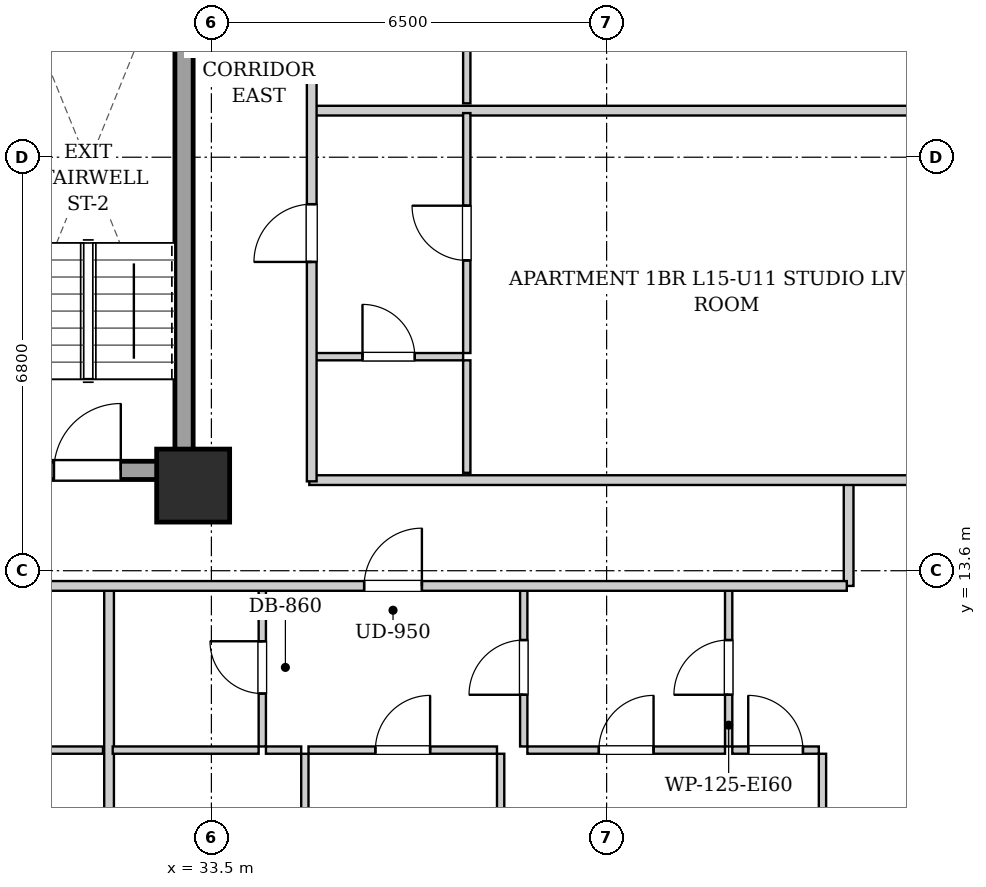
"""IFC4 building model, lengths in metres.
Left out: names, types, materials, properties, quantities, classifications, styles, units other than length and angle.
Written with IfcOpenShell. Run it as: python <this file> out.ifc"""

import sys

from ifc_helpers import new_model, si_unit, direction, frame, frame_2d, origin, origin_2d, place, context, subcontext, project, spatial, rectangle, extrude, element, fill, save


model = new_model("IFC4")
c1 = context("Model", 3, precision=1e-05, world=origin(), true_north=direction((0.0, 1.0)))
c2 = subcontext(c1, "Body", "Model", "MODEL_VIEW")
j1 = project(units=[si_unit("LENGTHUNIT", "METRE"), si_unit("PLANEANGLEUNIT", "RADIAN")], contexts=[c1])
p1 = place(None, origin())
s1 = spatial("IfcSite", under=j1, at=p1, CompositionType="ELEMENT")
p2 = place(p1, origin())
s2 = spatial("IfcBuilding", under=s1, at=p2, CompositionType="ELEMENT")
p3 = place(p2, frame((0.0, 0.0, 57.8)))
s3 = spatial("IfcBuildingStorey", under=s2, at=p3, CompositionType="ELEMENT", Elevation=57.8)
p4 = place(p3, frame((33.2, 15.0, 0.0), z_axis=(0.0, 0.0, 1.0), x_axis=(1.0, 0.0, 0.0)))
e1 = element("IfcColumn", 1, at=p4, inside=s3, PredefinedType="COLUMN", context=c2, shape_type="SweptSolid", body=[
    extrude(rectangle(XDim=1.2, YDim=1.2, at=origin_2d()), origin(), (0.0, 0.0, 1.0), 3.2),
])
p5 = place(p3, frame((33.05, 15.1, 0.0), z_axis=(0.0, 0.0, 1.0), x_axis=(0.0, 1.0, 0.0)))
e2 = element("IfcWall", 2, at=p5, inside=s3, PredefinedType="SHEAR", context=c2, shape_type="SweptSolid", body=[
    extrude(rectangle(XDim=9.0, YDim=0.3, at=frame_2d((4.5, 0.0))), origin(), (0.0, 0.0, 1.0), 2.94),
])
p6 = place(p3, frame((30.05, 15.25, 0.0), z_axis=(0.0, 0.0, 1.0), x_axis=(1.0, 0.0, 0.0)))
e3 = element("IfcWall", 3, at=p6, inside=s3, PredefinedType="SHEAR", context=c2, shape_type="SweptSolid", body=[
    extrude(rectangle(XDim=2.85, YDim=0.3, at=frame_2d((1.425, 0.0))), origin(), (0.0, 0.0, 1.0), 2.94),
])
p7 = place(p6, frame((0.86, 0.0, 0.0)))
e4 = element("IfcOpeningElement", 4, at=p7, cuts=e3, PredefinedType="OPENING", context=c2, shape_type="SweptSolid", body=[
    extrude(rectangle(XDim=1.1, YDim=2.05, at=frame_2d((0.55, 1.025))), frame((0.0, 0.16, 0.0), z_axis=(0.0, -1.0, 0.0), x_axis=(1.0, 0.0, 0.0)), (0.0, 0.0, 1.0), 0.32),
])
p8 = place(p3, frame((43.98, 13.35, 0.0), z_axis=(0.0, 0.0, 1.0), x_axis=(0.0, 1.0, 0.0)))
e5 = element("IfcWall", 5, at=p8, inside=s3, PredefinedType="PARTITIONING", context=c2, shape_type="SweptSolid", body=[
    extrude(rectangle(XDim=1.74, YDim=0.16, at=frame_2d((0.87, 0.0))), origin(), (0.0, 0.0, 1.0), 2.94),
])
p9 = place(p3, frame((35.11, 15.09, 0.0), z_axis=(0.0, 0.0, 1.0), x_axis=(1.0, 0.0, 0.0)))
e6 = element("IfcWall", 6, at=p9, inside=s3, PredefinedType="PARTITIONING", context=c2, shape_type="SweptSolid", body=[
    extrude(rectangle(XDim=11.11, YDim=0.16, at=frame_2d((5.555, 0.0))), origin(), (0.0, 0.0, 1.0), 2.232),
])
p10 = place(p3, frame((28.799, 10.65, 0.0), z_axis=(0.0, 0.0, 1.0), x_axis=(1.0, 0.0, 0.0)))
e7 = element("IfcWall", 7, at=p10, inside=s3, PredefinedType="PARTITIONING", context=c2, shape_type="SweptSolid", body=[
    extrude(rectangle(XDim=2.918, YDim=0.12, at=frame_2d((1.459, 0.0))), origin(), (0.0, 0.0, 1.0), 2.94),
])
p11 = place(p10, frame((1.009, 0.0, 0.0)))
e8 = element("IfcOpeningElement", 8, at=p11, cuts=e7, PredefinedType="OPENING", context=c2, shape_type="SweptSolid", body=[
    extrude(rectangle(XDim=0.9, YDim=2.05, at=frame_2d((0.45, 1.025))), frame((0.0, 0.07, 0.0), z_axis=(0.0, -1.0, 0.0), x_axis=(1.0, 0.0, 0.0)), (0.0, 0.0, 1.0), 0.14),
])
p12 = place(p3, frame((31.817, 0.28, 0.0), z_axis=(0.0, 0.0, 1.0), x_axis=(0.0, 1.0, 0.0)))
e9 = element("IfcWall", 9, at=p12, inside=s3, PredefinedType="PARTITIONING", context=c2, shape_type="SweptSolid", body=[
    extrude(rectangle(XDim=13.03, YDim=0.16, at=frame_2d((6.515, 0.0))), origin(), (0.0, 0.0, 1.0), 2.94),
])
p13 = place(p3, frame((34.337, 10.71, 0.0), z_axis=(0.0, 0.0, 1.0), x_axis=(0.0, 1.0, 0.0)))
e10 = element("IfcWall", 10, at=p13, inside=s3, PredefinedType="PARTITIONING", context=c2, shape_type="SweptSolid", body=[
    extrude(rectangle(XDim=2.6, YDim=0.12, at=frame_2d((1.3, 0.0))), origin(), (0.0, 0.0, 1.0), 2.94),
])
p14 = place(p13, frame((0.87, 0.0, 0.0)))
e11 = element("IfcOpeningElement", 11, at=p14, cuts=e10, PredefinedType="OPENING", context=c2, shape_type="SweptSolid", body=[
    extrude(rectangle(XDim=0.86, YDim=2.05, at=frame_2d((0.43, 1.025))), frame((0.0, 0.07, 0.0), z_axis=(0.0, -1.0, 0.0), x_axis=(1.0, 0.0, 0.0)), (0.0, 0.0, 1.0), 0.14),
])
p15 = place(p3, frame((31.877, 10.65, 0.0), z_axis=(0.0, 0.0, 1.0), x_axis=(1.0, 0.0, 0.0)))
e12 = element("IfcWall", 12, at=p15, inside=s3, PredefinedType="PARTITIONING", context=c2, shape_type="SweptSolid", body=[
    extrude(rectangle(XDim=2.4, YDim=0.12, at=frame_2d((1.2, 0.0))), origin(), (0.0, 0.0, 1.0), 2.94),
])
p16 = place(p3, frame((38.637, 10.71, 0.0), z_axis=(0.0, 0.0, 1.0), x_axis=(0.0, 1.0, 0.0)))
e13 = element("IfcWall", 13, at=p16, inside=s3, PredefinedType="PARTITIONING", context=c2, shape_type="SweptSolid", body=[
    extrude(rectangle(XDim=2.6, YDim=0.12, at=frame_2d((1.3, 0.0))), origin(), (0.0, 0.0, 1.0), 2.94),
])
p17 = place(p16, frame((0.85, 0.0, 0.0)))
e14 = element("IfcOpeningElement", 14, at=p17, cuts=e13, PredefinedType="OPENING", context=c2, shape_type="SweptSolid", body=[
    extrude(rectangle(XDim=0.9, YDim=2.05, at=frame_2d((0.45, 1.025))), frame((0.0, 0.07, 0.0), z_axis=(0.0, -1.0, 0.0), x_axis=(1.0, 0.0, 0.0)), (0.0, 0.0, 1.0), 0.14),
])
p18 = place(p3, frame((34.397, 10.65, 0.0), z_axis=(0.0, 0.0, 1.0), x_axis=(1.0, 0.0, 0.0)))
e15 = element("IfcWall", 15, at=p18, inside=s3, PredefinedType="PARTITIONING", context=c2, shape_type="SweptSolid", body=[
    extrude(rectangle(XDim=0.58, YDim=0.12, at=frame_2d((0.29, 0.0))), origin(), (0.0, 0.0, 1.0), 2.94),
])
p19 = place(p3, frame((35.097, 10.65, 0.0), z_axis=(0.0, 0.0, 1.0), x_axis=(1.0, 0.0, 0.0)))
e16 = element("IfcWall", 16, at=p19, inside=s3, PredefinedType="PARTITIONING", context=c2, shape_type="SweptSolid", body=[
    extrude(rectangle(XDim=3.1, YDim=0.12, at=frame_2d((1.55, 0.0))), origin(), (0.0, 0.0, 1.0), 2.94),
])
p20 = place(p19, frame((1.1, 0.0, 0.0)))
e17 = element("IfcOpeningElement", 17, at=p20, cuts=e16, PredefinedType="OPENING", context=c2, shape_type="SweptSolid", body=[
    extrude(rectangle(XDim=0.9, YDim=2.05, at=frame_2d((0.45, 1.025))), frame((0.0, 0.07, 0.0), z_axis=(0.0, -1.0, 0.0), x_axis=(1.0, 0.0, 0.0)), (0.0, 0.0, 1.0), 0.14),
])
p21 = place(p3, frame((42.007, 10.71, 0.0), z_axis=(0.0, 0.0, 1.0), x_axis=(0.0, 1.0, 0.0)))
e18 = element("IfcWall", 18, at=p21, inside=s3, PredefinedType="PARTITIONING", context=c2, shape_type="SweptSolid", body=[
    extrude(rectangle(XDim=2.6, YDim=0.12, at=frame_2d((1.3, 0.0))), origin(), (0.0, 0.0, 1.0), 2.94),
])
p22 = place(p21, frame((0.85, 0.0, 0.0)))
e19 = element("IfcOpeningElement", 19, at=p22, cuts=e18, PredefinedType="OPENING", context=c2, shape_type="SweptSolid", body=[
    extrude(rectangle(XDim=0.9, YDim=2.05, at=frame_2d((0.45, 1.025))), frame((0.0, 0.07, 0.0), z_axis=(0.0, -1.0, 0.0), x_axis=(1.0, 0.0, 0.0)), (0.0, 0.0, 1.0), 0.14),
])
p23 = place(p3, frame((38.697, 10.65, 0.0), z_axis=(0.0, 0.0, 1.0), x_axis=(1.0, 0.0, 0.0)))
e20 = element("IfcWall", 20, at=p23, inside=s3, PredefinedType="PARTITIONING", context=c2, shape_type="SweptSolid", body=[
    extrude(rectangle(XDim=3.25, YDim=0.12, at=frame_2d((1.625, 0.0))), origin(), (0.0, 0.0, 1.0), 2.94),
])
p24 = place(p23, frame((1.175, 0.0, 0.0)))
e21 = element("IfcOpeningElement", 21, at=p24, cuts=e20, PredefinedType="OPENING", context=c2, shape_type="SweptSolid", body=[
    extrude(rectangle(XDim=0.9, YDim=2.05, at=frame_2d((0.45, 1.025))), frame((0.0, 0.07, 0.0), z_axis=(0.0, -1.0, 0.0), x_axis=(1.0, 0.0, 0.0)), (0.0, 0.0, 1.0), 0.14),
])
p25 = place(p3, frame((42.067, 10.65, 0.0), z_axis=(0.0, 0.0, 1.0), x_axis=(1.0, 0.0, 0.0)))
e22 = element("IfcWall", 22, at=p25, inside=s3, PredefinedType="PARTITIONING", context=c2, shape_type="SweptSolid", body=[
    extrude(rectangle(XDim=1.423, YDim=0.12, at=frame_2d((0.711, 0.0))), origin(), (0.0, 0.0, 1.0), 2.94),
])
p26 = place(p25, frame((0.262, 0.0, 0.0)))
e23 = element("IfcOpeningElement", 23, at=p26, cuts=e22, PredefinedType="OPENING", context=c2, shape_type="SweptSolid", body=[
    extrude(rectangle(XDim=0.9, YDim=2.05, at=frame_2d((0.45, 1.025))), frame((0.0, 0.07, 0.0), z_axis=(0.0, -1.0, 0.0), x_axis=(1.0, 0.0, 0.0)), (0.0, 0.0, 1.0), 0.14),
])
p27 = place(p3, frame((35.037, 0.28, 0.0), z_axis=(0.0, 0.0, 1.0), x_axis=(0.0, 1.0, 0.0)))
e24 = element("IfcWall", 24, at=p27, inside=s3, PredefinedType="PARTITIONING", context=c2, shape_type="SweptSolid", body=[
    extrude(rectangle(XDim=10.31, YDim=0.12, at=frame_2d((5.155, 0.0))), origin(), (0.0, 0.0, 1.0), 2.94),
])
p28 = place(p27, frame((4.69, 0.0, 0.0)))
e25 = element("IfcOpeningElement", 25, at=p28, cuts=e24, PredefinedType="OPENING", context=c2, shape_type="SweptSolid", body=[
    extrude(rectangle(XDim=0.9, YDim=2.05, at=frame_2d((0.45, 1.025))), frame((0.0, 0.07, 0.0), z_axis=(0.0, -1.0, 0.0), x_axis=(1.0, 0.0, 0.0)), (0.0, 0.0, 1.0), 0.14),
])
p29 = place(p3, frame((38.257, 0.28, 0.0), z_axis=(0.0, 0.0, 1.0), x_axis=(0.0, 1.0, 0.0)))
e26 = element("IfcWall", 26, at=p29, inside=s3, PredefinedType="PARTITIONING", context=c2, shape_type="SweptSolid", body=[
    extrude(rectangle(XDim=10.31, YDim=0.12, at=frame_2d((5.155, 0.0))), origin(), (0.0, 0.0, 1.0), 2.94),
])
p30 = place(p29, frame((4.69, 0.0, 0.0)))
e27 = element("IfcOpeningElement", 27, at=p30, cuts=e26, PredefinedType="OPENING", context=c2, shape_type="SweptSolid", body=[
    extrude(rectangle(XDim=0.9, YDim=2.05, at=frame_2d((0.45, 1.025))), frame((0.0, 0.07, 0.0), z_axis=(0.0, -1.0, 0.0), x_axis=(1.0, 0.0, 0.0)), (0.0, 0.0, 1.0), 0.14),
])
p31 = place(p3, frame((43.55, 0.28, 0.0), z_axis=(0.0, 0.0, 1.0), x_axis=(0.0, 1.0, 0.0)))
e28 = element("IfcWall", 28, at=p31, inside=s3, PredefinedType="PARTITIONING", context=c2, shape_type="SweptSolid", body=[
    extrude(rectangle(XDim=10.31, YDim=0.12, at=frame_2d((5.155, 0.0))), origin(), (0.0, 0.0, 1.0), 2.94),
])
p32 = place(p31, frame((4.69, 0.0, 0.0)))
e29 = element("IfcOpeningElement", 29, at=p32, cuts=e28, PredefinedType="OPENING", context=c2, shape_type="SweptSolid", body=[
    extrude(rectangle(XDim=0.9, YDim=2.05, at=frame_2d((0.45, 1.025))), frame((0.0, 0.07, 0.0), z_axis=(0.0, -1.0, 0.0), x_axis=(1.0, 0.0, 0.0)), (0.0, 0.0, 1.0), 0.14),
])
p33 = place(p3, frame((35.19, 21.166, 0.0), z_axis=(0.0, 0.0, 1.0), x_axis=(1.0, 0.0, 0.0)))
e30 = element("IfcWall", 30, at=p33, inside=s3, PredefinedType="PARTITIONING", context=c2, shape_type="SweptSolid", body=[
    extrude(rectangle(XDim=11.03, YDim=0.16, at=frame_2d((5.515, 0.0))), origin(), (0.0, 0.0, 1.0), 2.94),
])
p34 = place(p3, frame((35.19, 17.12, 0.0), z_axis=(0.0, 0.0, 1.0), x_axis=(1.0, 0.0, 0.0)))
e31 = element("IfcWall", 31, at=p34, inside=s3, PredefinedType="PARTITIONING", context=c2, shape_type="SweptSolid", body=[
    extrude(rectangle(XDim=2.45, YDim=0.12, at=frame_2d((1.225, 0.0))), origin(), (0.0, 0.0, 1.0), 2.94),
])
p35 = place(p34, frame((0.795, 0.0, 0.0)))
e32 = element("IfcOpeningElement", 32, at=p35, cuts=e31, PredefinedType="OPENING", context=c2, shape_type="SweptSolid", body=[
    extrude(rectangle(XDim=0.86, YDim=2.05, at=frame_2d((0.43, 1.025))), frame((0.0, 0.07, 0.0), z_axis=(0.0, -1.0, 0.0), x_axis=(1.0, 0.0, 0.0)), (0.0, 0.0, 1.0), 0.14),
])
p36 = place(p3, frame((37.7, 15.21, 0.0), z_axis=(0.0, 0.0, 1.0), x_axis=(0.0, 1.0, 0.0)))
e33 = element("IfcWall", 33, at=p36, inside=s3, PredefinedType="PARTITIONING", context=c2, shape_type="SweptSolid", body=[
    extrude(rectangle(XDim=1.85, YDim=0.12, at=frame_2d((0.925, 0.0))), origin(), (0.0, 0.0, 1.0), 2.94),
])
p37 = place(p3, frame((37.7, 17.18, 0.0), z_axis=(0.0, 0.0, 1.0), x_axis=(0.0, 1.0, 0.0)))
e34 = element("IfcWall", 34, at=p37, inside=s3, PredefinedType="PARTITIONING", context=c2, shape_type="SweptSolid", body=[
    extrude(rectangle(XDim=3.946, YDim=0.12, at=frame_2d((1.973, 0.0))), origin(), (0.0, 0.0, 1.0), 2.94),
])
p38 = place(p37, frame((1.523, 0.0, 0.0)))
e35 = element("IfcOpeningElement", 35, at=p38, cuts=e34, PredefinedType="OPENING", context=c2, shape_type="SweptSolid", body=[
    extrude(rectangle(XDim=0.9, YDim=2.05, at=frame_2d((0.45, 1.025))), frame((0.0, 0.07, 0.0), z_axis=(0.0, -1.0, 0.0), x_axis=(1.0, 0.0, 0.0)), (0.0, 0.0, 1.0), 0.14),
])
p39 = place(p3, frame((37.7, 21.286, 0.0), z_axis=(0.0, 0.0, 1.0), x_axis=(0.0, 1.0, 0.0)))
e36 = element("IfcWall", 36, at=p39, inside=s3, PredefinedType="PARTITIONING", context=c2, shape_type="SweptSolid", body=[
    extrude(rectangle(XDim=2.121, YDim=0.12, at=frame_2d((1.061, 0.0))), origin(), (0.0, 0.0, 1.0), 2.94),
])
p40 = place(p3, frame((10.05, 13.35, 0.0), z_axis=(0.0, 0.0, 1.0), x_axis=(1.0, 0.0, 0.0)))
e37 = element("IfcWall", 37, at=p40, inside=s3, PredefinedType="PARTITIONING", context=c2, shape_type="SweptSolid", body=[
    extrude(rectangle(XDim=33.9, YDim=0.16, at=frame_2d((16.95, 0.0))), origin(), (0.0, 0.0, 1.0), 2.94),
])
p41 = place(p40, frame((0.813, 0.0, 0.0)))
e38 = element("IfcOpeningElement", 38, at=p41, cuts=e37, PredefinedType="OPENING", context=c2, shape_type="SweptSolid", body=[
    extrude(rectangle(XDim=0.95, YDim=2.1, at=frame_2d((0.475, 1.05))), frame((0.0, 0.09, 0.0), z_axis=(0.0, -1.0, 0.0), x_axis=(1.0, 0.0, 0.0)), (0.0, 0.0, 1.0), 0.18),
])
p42 = place(p40, frame((6.04, 0.0, 0.0)))
e39 = element("IfcOpeningElement", 39, at=p42, cuts=e37, PredefinedType="OPENING", context=c2, shape_type="SweptSolid", body=[
    extrude(rectangle(XDim=0.95, YDim=2.1, at=frame_2d((0.475, 1.05))), frame((0.0, 0.09, 0.0), z_axis=(0.0, -1.0, 0.0), x_axis=(1.0, 0.0, 0.0)), (0.0, 0.0, 1.0), 0.18),
])
p43 = place(p40, frame((18.09, 0.0, 0.0)))
e40 = element("IfcOpeningElement", 40, at=p43, cuts=e37, PredefinedType="OPENING", context=c2, shape_type="SweptSolid", body=[
    extrude(rectangle(XDim=0.95, YDim=2.1, at=frame_2d((0.475, 1.05))), frame((0.0, 0.09, 0.0), z_axis=(0.0, -1.0, 0.0), x_axis=(1.0, 0.0, 0.0)), (0.0, 0.0, 1.0), 0.18),
])
p44 = place(p40, frame((25.962, 0.0, 0.0)))
e41 = element("IfcOpeningElement", 41, at=p44, cuts=e37, PredefinedType="OPENING", context=c2, shape_type="SweptSolid", body=[
    extrude(rectangle(XDim=0.95, YDim=2.1, at=frame_2d((0.475, 1.05))), frame((0.0, 0.09, 0.0), z_axis=(0.0, -1.0, 0.0), x_axis=(1.0, 0.0, 0.0)), (0.0, 0.0, 1.0), 0.18),
])
p45 = place(p3, frame((35.15, 15.07, 0.0), z_axis=(0.0, 0.0, 1.0), x_axis=(0.0, 1.0, 0.0)))
e42 = element("IfcWall", 42, at=p45, inside=s3, PredefinedType="PARTITIONING", context=c2, shape_type="SweptSolid", body=[
    extrude(rectangle(XDim=13.93, YDim=0.16, at=frame_2d((6.965, 0.0))), origin(), (0.0, 0.0, 1.0), 2.94),
])
p46 = place(p45, frame((3.608, 0.0, 0.0)))
e43 = element("IfcOpeningElement", 43, at=p46, cuts=e42, PredefinedType="OPENING", context=c2, shape_type="SweptSolid", body=[
    extrude(rectangle(XDim=0.95, YDim=2.1, at=frame_2d((0.475, 1.05))), frame((0.0, 0.09, 0.0), z_axis=(0.0, -1.0, 0.0), x_axis=(1.0, 0.0, 0.0)), (0.0, 0.0, 1.0), 0.18),
])
p47 = place(p45, frame((10.649, 0.0, 0.0)))
e44 = element("IfcOpeningElement", 44, at=p47, cuts=e42, PredefinedType="OPENING", context=c2, shape_type="SweptSolid", body=[
    extrude(rectangle(XDim=0.95, YDim=2.1, at=frame_2d((0.475, 1.05))), frame((0.0, 0.09, 0.0), z_axis=(0.0, -1.0, 0.0), x_axis=(1.0, 0.0, 0.0)), (0.0, 0.0, 1.0), 0.18),
])
p48 = place(p7, origin())
e45 = element("IfcDoor", 45, at=p48, inside=s3, OperationType="SINGLE_SWING_RIGHT", PredefinedType="DOOR", context=c2, shape_type="SweptSolid", body=[
    extrude(rectangle(XDim=1.1, YDim=2.05, at=frame_2d((0.55, 1.025))), frame((0.0, 0.025, 0.0), z_axis=(0.0, -1.0, 0.0), x_axis=(1.0, 0.0, 0.0)), (0.0, 0.0, 1.0), 0.05),
])
fill(e4, e45)
p49 = place(p14, origin())
e46 = element("IfcDoor", 46, at=p49, inside=s3, OperationType="SINGLE_SWING_RIGHT", PredefinedType="DOOR", context=c2, shape_type="SweptSolid", body=[
    extrude(rectangle(XDim=0.86, YDim=2.05, at=frame_2d((0.43, 1.025))), frame((0.0, 0.025, 0.0), z_axis=(0.0, -1.0, 0.0), x_axis=(1.0, 0.0, 0.0)), (0.0, 0.0, 1.0), 0.05),
])
fill(e11, e46)
p50 = place(p17, origin())
e47 = element("IfcDoor", 47, at=p50, inside=s3, OperationType="SINGLE_SWING_LEFT", PredefinedType="DOOR", context=c2, shape_type="SweptSolid", body=[
    extrude(rectangle(XDim=0.9, YDim=2.05, at=frame_2d((0.45, 1.025))), frame((0.0, 0.025, 0.0), z_axis=(0.0, -1.0, 0.0), x_axis=(1.0, 0.0, 0.0)), (0.0, 0.0, 1.0), 0.05),
])
fill(e14, e47)
p51 = place(p20, origin())
e48 = element("IfcDoor", 48, at=p51, inside=s3, OperationType="SINGLE_SWING_RIGHT", PredefinedType="DOOR", context=c2, shape_type="SweptSolid", body=[
    extrude(rectangle(XDim=0.9, YDim=2.05, at=frame_2d((0.45, 1.025))), frame((0.0, 0.025, 0.0), z_axis=(0.0, -1.0, 0.0), x_axis=(1.0, 0.0, 0.0)), (0.0, 0.0, 1.0), 0.05),
])
fill(e17, e48)
p52 = place(p22, origin())
e49 = element("IfcDoor", 49, at=p52, inside=s3, OperationType="SINGLE_SWING_LEFT", PredefinedType="DOOR", context=c2, shape_type="SweptSolid", body=[
    extrude(rectangle(XDim=0.9, YDim=2.05, at=frame_2d((0.45, 1.025))), frame((0.0, 0.025, 0.0), z_axis=(0.0, -1.0, 0.0), x_axis=(1.0, 0.0, 0.0)), (0.0, 0.0, 1.0), 0.05),
])
fill(e19, e49)
p53 = place(p24, origin())
e50 = element("IfcDoor", 50, at=p53, inside=s3, OperationType="SINGLE_SWING_RIGHT", PredefinedType="DOOR", context=c2, shape_type="SweptSolid", body=[
    extrude(rectangle(XDim=0.9, YDim=2.05, at=frame_2d((0.45, 1.025))), frame((0.0, 0.025, 0.0), z_axis=(0.0, -1.0, 0.0), x_axis=(1.0, 0.0, 0.0)), (0.0, 0.0, 1.0), 0.05),
])
fill(e21, e50)
p54 = place(p26, origin())
e51 = element("IfcDoor", 51, at=p54, inside=s3, OperationType="SINGLE_SWING_LEFT", PredefinedType="DOOR", context=c2, shape_type="SweptSolid", body=[
    extrude(rectangle(XDim=0.9, YDim=2.05, at=frame_2d((0.45, 1.025))), frame((0.0, 0.025, 0.0), z_axis=(0.0, -1.0, 0.0), x_axis=(1.0, 0.0, 0.0)), (0.0, 0.0, 1.0), 0.05),
])
fill(e23, e51)
p55 = place(p35, origin())
e52 = element("IfcDoor", 52, at=p55, inside=s3, OperationType="SINGLE_SWING_LEFT", PredefinedType="DOOR", context=c2, shape_type="SweptSolid", body=[
    extrude(rectangle(XDim=0.86, YDim=2.05, at=frame_2d((0.43, 1.025))), frame((0.0, 0.025, 0.0), z_axis=(0.0, -1.0, 0.0), x_axis=(1.0, 0.0, 0.0)), (0.0, 0.0, 1.0), 0.05),
])
fill(e32, e52)
p56 = place(p38, origin())
e53 = element("IfcDoor", 53, at=p56, inside=s3, OperationType="SINGLE_SWING_RIGHT", PredefinedType="DOOR", context=c2, shape_type="SweptSolid", body=[
    extrude(rectangle(XDim=0.9, YDim=2.05, at=frame_2d((0.45, 1.025))), frame((0.0, 0.025, 0.0), z_axis=(0.0, -1.0, 0.0), x_axis=(1.0, 0.0, 0.0)), (0.0, 0.0, 1.0), 0.05),
])
fill(e35, e53)
p57 = place(p44, origin())
e54 = element("IfcDoor", 54, at=p57, inside=s3, OperationType="SINGLE_SWING_RIGHT", PredefinedType="DOOR", context=c2, shape_type="SweptSolid", body=[
    extrude(rectangle(XDim=0.95, YDim=2.1, at=frame_2d((0.475, 1.05))), frame((0.0, 0.025, 0.0), z_axis=(0.0, -1.0, 0.0), x_axis=(1.0, 0.0, 0.0)), (0.0, 0.0, 1.0), 0.05),
])
fill(e41, e54)
p58 = place(p46, origin())
e55 = element("IfcDoor", 55, at=p58, inside=s3, OperationType="SINGLE_SWING_LEFT", PredefinedType="DOOR", context=c2, shape_type="SweptSolid", body=[
    extrude(rectangle(XDim=0.95, YDim=2.1, at=frame_2d((0.475, 1.05))), frame((0.0, 0.025, 0.0), z_axis=(0.0, -1.0, 0.0), x_axis=(1.0, 0.0, 0.0)), (0.0, 0.0, 1.0), 0.05),
])
fill(e43, e55)
save(model, sys.argv[1])
